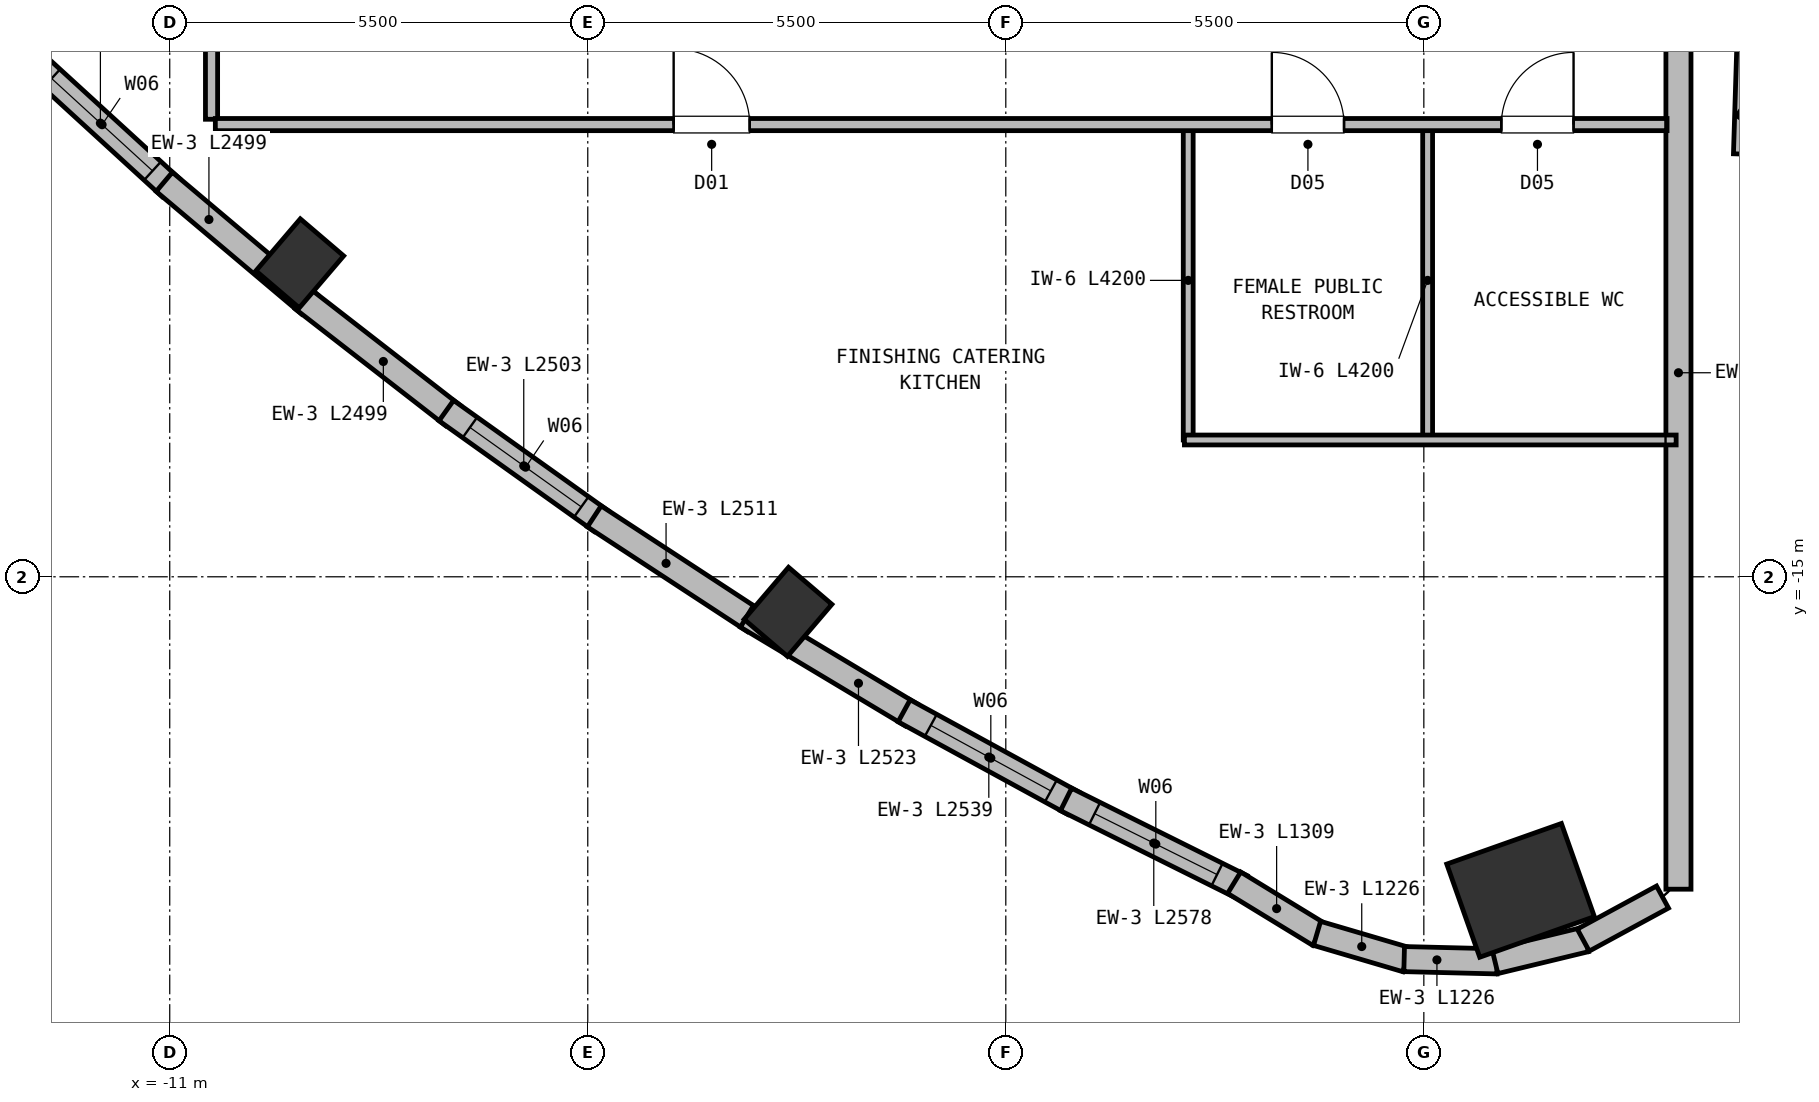
"""IFC4 building model, lengths in metres.
Left out: names, types, materials, properties, quantities, classifications, styles, units other than length and angle.
Written with IfcOpenShell. Run it as: python <this file> out.ifc"""

import sys

from ifc_helpers import new_model, si_unit, direction, frame, frame_2d, origin, origin_2d, place, context, subcontext, project, spatial, rectangle, extrude, element, fill, save


model = new_model("IFC4")
c1 = context("Model", 3, precision=1e-05, world=origin(), true_north=direction((0.0, 1.0)))
c2 = subcontext(c1, "Body", "Model", "MODEL_VIEW")
j1 = project(units=[si_unit("LENGTHUNIT", "METRE"), si_unit("PLANEANGLEUNIT", "RADIAN")], contexts=[c1])
p1 = place(None, origin())
s1 = spatial("IfcSite", under=j1, at=p1, CompositionType="ELEMENT")
p2 = place(p1, origin())
s2 = spatial("IfcBuilding", under=s1, at=p2, CompositionType="ELEMENT")
p3 = place(p2, frame((0.0, 0.0, 294.8)))
s3 = spatial("IfcBuildingStorey", under=s2, at=p3, CompositionType="ELEMENT", Elevation=294.8)
for number, where, z_axis, x_axis in (
    (1, (-9.289, -10.876, 0.0), (0.0, 0.0, 1.0), (-0.76, 0.649, 0.0)),
    (2, (-2.865, -15.461, 0.0), (0.0, 0.0, 1.0), (-0.76, 0.649, 0.0)),
):
    element("IfcColumn", number, at=place(p3, frame(where, z_axis=z_axis, x_axis=x_axis)), inside=s3, PredefinedType="COLUMN", context=c2, shape_type="SweptSolid", body=[
        extrude(rectangle(XDim=0.75, YDim=0.9, at=origin_2d()), origin(), (0.0, 0.0, 1.0), 4.4),
    ])
p4 = place(p3, frame((6.773, -19.126, 0.0), z_axis=(0.0, 0.0, 1.0), x_axis=(-0.333806859234, 0.942641491092, 0.0)))
e3 = element("IfcColumn", 3, at=p4, inside=s3, PredefinedType="COLUMN", context=c2, shape_type="SweptSolid", body=[
    extrude(rectangle(XDim=1.3, YDim=1.6, at=origin_2d()), origin(), (0.0, 0.0, 1.0), 4.4),
])
p5 = place(p3, frame((8.85, -5.52, 0.0), z_axis=(0.0, 0.0, 1.0), x_axis=(0.0, -1.0, 0.0)))
e4 = element("IfcWall", 4, at=p5, inside=s3, PredefinedType="SOLIDWALL", context=c2, shape_type="SweptSolid", body=[
    extrude(rectangle(XDim=13.591, YDim=0.33, at=frame_2d((6.795, 0.0))), origin(), (0.0, 0.0, 1.0), 4.13),
])
p6 = place(p3, frame((9.739, -9.439, 0.0), z_axis=(0.0, 0.0, 1.0), x_axis=(0.031147484759, 0.999514799387, 0.0)))
e5 = element("IfcWall", 5, at=p6, inside=s3, PredefinedType="SOLIDWALL", context=c2, shape_type="SweptSolid", body=[
    extrude(rectangle(XDim=6.114, YDim=0.33, at=frame_2d((3.057, 0.0))), origin(), (0.0, 0.0, 1.0), 3.65),
])
p7 = place(p3, frame((-10.989, -9.876, 0.0), z_axis=(0.0, 0.0, 1.0), x_axis=(-0.737627628948, 0.675207731748, 0.0)))
e6 = element("IfcWall", 6, at=p7, inside=s3, PredefinedType="SOLIDWALL", context=c2, shape_type="SweptSolid", body=[
    extrude(rectangle(XDim=2.503, YDim=0.33, at=frame_2d((1.251, 0.0))), origin(), (0.0, 0.0, 1.0), 4.13),
])
p8 = place(p7, frame((0.322, 0.0, 0.72)))
e7 = element("IfcOpeningElement", 7, at=p8, cuts=e6, PredefinedType="OPENING", context=c2, shape_type="SweptSolid", body=[
    extrude(rectangle(XDim=1.8, YDim=2.25, at=frame_2d((0.9, 1.125))), frame((0.0, 0.175, 0.0), z_axis=(0.0, -1.0, 0.0), x_axis=(1.0, 0.0, 0.0)), (0.0, 0.0, 1.0), 0.35),
])
p9 = place(p3, frame((-9.161, -11.415, 0.0), z_axis=(0.0, 0.0, 1.0), x_axis=(-0.764315556833, 0.644842406781, 0.0)))
e8 = element("IfcWall", 8, at=p9, inside=s3, PredefinedType="SOLIDWALL", context=c2, shape_type="SweptSolid", body=[
    extrude(rectangle(XDim=2.499, YDim=0.33, at=frame_2d((1.25, 0.0))), origin(), (0.0, 0.0, 1.0), 4.13),
])
p10 = place(p3, frame((-7.273, -12.879, 0.0), z_axis=(0.0, 0.0, 1.0), x_axis=(-0.789841179094, 0.613311431336, 0.0)))
e9 = element("IfcWall", 9, at=p10, inside=s3, PredefinedType="SOLIDWALL", context=c2, shape_type="SweptSolid", body=[
    extrude(rectangle(XDim=2.499, YDim=0.33, at=frame_2d((1.25, 0.0))), origin(), (0.0, 0.0, 1.0), 4.13),
])
p11 = place(p3, frame((-5.323, -14.267, 0.0), z_axis=(0.0, 0.0, 1.0), x_axis=(-0.814029925436, 0.580822933857, 0.0)))
e10 = element("IfcWall", 10, at=p11, inside=s3, PredefinedType="SOLIDWALL", context=c2, shape_type="SweptSolid", body=[
    extrude(rectangle(XDim=2.503, YDim=0.33, at=frame_2d((1.251, 0.0))), origin(), (0.0, 0.0, 1.0), 4.13),
])
p12 = place(p11, frame((0.322, 0.0, 0.72)))
e11 = element("IfcOpeningElement", 11, at=p12, cuts=e10, PredefinedType="OPENING", context=c2, shape_type="SweptSolid", body=[
    extrude(rectangle(XDim=1.8, YDim=2.25, at=frame_2d((0.9, 1.125))), frame((0.0, 0.175, 0.0), z_axis=(0.0, -1.0, 0.0), x_axis=(1.0, 0.0, 0.0)), (0.0, 0.0, 1.0), 0.35),
])
p13 = place(p3, frame((-3.313, -15.58, 0.0), z_axis=(0.0, 0.0, 1.0), x_axis=(-0.836746876737, 0.547589868671, 0.0)))
e12 = element("IfcWall", 12, at=p13, inside=s3, PredefinedType="SOLIDWALL", context=c2, shape_type="SweptSolid", body=[
    extrude(rectangle(XDim=2.511, YDim=0.33, at=frame_2d((1.255, 0.0))), origin(), (0.0, 0.0, 1.0), 4.13),
])
p14 = place(p3, frame((-1.242, -16.818, 0.0), z_axis=(0.0, 0.0, 1.0), x_axis=(-0.857902474262, 0.513812557899, 0.0)))
e13 = element("IfcWall", 13, at=p14, inside=s3, PredefinedType="SOLIDWALL", context=c2, shape_type="SweptSolid", body=[
    extrude(rectangle(XDim=2.523, YDim=0.33, at=frame_2d((1.262, 0.0))), origin(), (0.0, 0.0, 1.0), 4.13),
])
p15 = place(p3, frame((0.89, -17.98, 0.0), z_axis=(0.0, 0.0, 1.0), x_axis=(-0.877542510611, 0.479498844702, 0.0)))
e14 = element("IfcWall", 14, at=p15, inside=s3, PredefinedType="SOLIDWALL", context=c2, shape_type="SweptSolid", body=[
    extrude(rectangle(XDim=2.539, YDim=0.33, at=frame_2d((1.269, 0.0))), origin(), (0.0, 0.0, 1.0), 4.13),
])
p16 = place(p15, frame((0.339, 0.0, 0.72)))
e15 = element("IfcOpeningElement", 15, at=p16, cuts=e14, PredefinedType="OPENING", context=c2, shape_type="SweptSolid", body=[
    extrude(rectangle(XDim=1.8, YDim=2.25, at=frame_2d((0.9, 1.125))), frame((0.0, 0.175, 0.0), z_axis=(0.0, -1.0, 0.0), x_axis=(1.0, 0.0, 0.0)), (0.0, 0.0, 1.0), 0.35),
])
p17 = place(p3, frame((3.101, -19.078, 0.0), z_axis=(0.0, 0.0, 1.0), x_axis=(-0.895277941462, 0.445508033073, 0.0)))
e16 = element("IfcWall", 16, at=p17, inside=s3, PredefinedType="SOLIDWALL", context=c2, shape_type="SweptSolid", body=[
    extrude(rectangle(XDim=2.578, YDim=0.33, at=frame_2d((1.289, 0.0))), origin(), (0.0, 0.0, 1.0), 4.13),
])
p18 = place(p17, frame((0.359, 0.0, 0.72)))
e17 = element("IfcOpeningElement", 17, at=p18, cuts=e16, PredefinedType="OPENING", context=c2, shape_type="SweptSolid", body=[
    extrude(rectangle(XDim=1.8, YDim=2.25, at=frame_2d((0.9, 1.125))), frame((0.0, 0.175, 0.0), z_axis=(0.0, -1.0, 0.0), x_axis=(1.0, 0.0, 0.0)), (0.0, 0.0, 1.0), 0.35),
])
p19 = place(p3, frame((4.122, -19.708, 0.0), z_axis=(0.0, 0.0, 1.0), x_axis=(-0.853318707867, 0.521389665034, 0.0)))
e18 = element("IfcWall", 18, at=p19, inside=s3, PredefinedType="SOLIDWALL", context=c2, shape_type="SweptSolid", body=[
    extrude(rectangle(XDim=1.309, YDim=0.33, at=frame_2d((0.655, 0.0))), origin(), (0.0, 0.0, 1.0), 4.13),
])
for number, where, z_axis, x_axis in (
    (19, (5.271, -20.038, 0.0), (0.0, 0.0, 1.0), (-0.959, 0.283, 0.0)),
    (20, (6.467, -20.061, 0.0), (0.0, 0.0, 1.0), (-1.0, 0.025, 0.0)),
):
    element("IfcWall", number, at=place(p3, frame(where, z_axis=z_axis, x_axis=x_axis)), inside=s3, PredefinedType="SOLIDWALL", context=c2, shape_type="SweptSolid", body=[
        extrude(rectangle(XDim=1.226, YDim=0.33, at=frame_2d((0.613, 0.0))), origin(), (0.0, 0.0, 1.0), 4.13),
    ])
p20 = place(p3, frame((7.627, -19.772, 0.0), z_axis=(0.0, 0.0, 1.0), x_axis=(-0.97199913572, -0.234984425353, 0.0)))
e21 = element("IfcWall", 21, at=p20, inside=s3, PredefinedType="SOLIDWALL", context=c2, shape_type="SweptSolid", body=[
    extrude(rectangle(XDim=1.226, YDim=0.33, at=frame_2d((0.613, 0.0))), origin(), (0.0, 0.0, 1.0), 4.13),
])
p21 = place(p3, frame((8.64, -19.214, 0.0), z_axis=(0.0, 0.0, 1.0), x_axis=(-0.878860825238, -0.477078242914, 0.0)))
e22 = element("IfcWall", 22, at=p21, inside=s3, PredefinedType="SOLIDWALL", context=c2, shape_type="SweptSolid", body=[
    extrude(rectangle(XDim=1.187, YDim=0.33, at=frame_2d((0.593, 0.0))), origin(), (0.0, 0.0, 1.0), 4.13),
])
p22 = place(p3, frame((12.352, -10.593, 0.0), z_axis=(0.0, 0.0, 1.0), x_axis=(-0.82687387766, 0.562387402459, 0.0)))
e23 = element("IfcWall", 23, at=p22, inside=s3, PredefinedType="SOLIDWALL", context=c2, shape_type="SweptSolid", body=[
    extrude(rectangle(XDim=3.193, YDim=0.33, at=frame_2d((1.596, 0.0))), origin(), (0.0, 0.0, 1.0), 3.65),
])
for number, where, z_axis, x_axis in (
    (24, (2.4, -9.0, 0.0), (0.0, 0.0, 1.0), (0.0, -1.0, 0.0)),
    (25, (5.55, -9.0, 0.0), (0.0, 0.0, 1.0), (0.0, -1.0, 0.0)),
):
    element("IfcWall", number, at=place(p3, frame(where, z_axis=z_axis, x_axis=x_axis)), inside=s3, PredefinedType="PARTITIONING", context=c2, shape_type="SweptSolid", body=[
        extrude(rectangle(XDim=4.2, YDim=0.13, at=frame_2d((2.1, 0.0))), origin(), (0.0, 0.0, 1.0), 4.13),
    ])
p23 = place(p3, frame((2.35, -13.2, 0.0), z_axis=(0.0, 0.0, 1.0), x_axis=(1.0, 0.0, 0.0)))
e26 = element("IfcWall", 26, at=p23, inside=s3, PredefinedType="PARTITIONING", context=c2, shape_type="SweptSolid", body=[
    extrude(rectangle(XDim=6.469, YDim=0.13, at=frame_2d((3.235, 0.0))), origin(), (0.0, 0.0, 1.0), 4.13),
])
p24 = place(p3, frame((-10.45, 1.1, 0.0), z_axis=(0.0, 0.0, 1.0), x_axis=(0.0, -1.0, 0.0)))
e27 = element("IfcWall", 27, at=p24, inside=s3, PredefinedType="PARTITIONING", context=c2, shape_type="SweptSolid", body=[
    extrude(rectangle(XDim=10.08, YDim=0.16, at=frame_2d((5.04, 0.0))), origin(), (0.0, 0.0, 1.0), 4.13),
])
p25 = place(p3, frame((-10.4, -9.05, 0.0), z_axis=(0.0, 0.0, 1.0), x_axis=(1.0, 0.0, 0.0)))
e28 = element("IfcWall", 28, at=p25, inside=s3, PredefinedType="PARTITIONING", context=c2, shape_type="SweptSolid", body=[
    extrude(rectangle(XDim=19.1, YDim=0.16, at=frame_2d((9.55, 0.0))), origin(), (0.0, 0.0, 1.0), 4.13),
])
p26 = place(p25, frame((6.03, 0.0, 0.0)))
e29 = element("IfcOpeningElement", 29, at=p26, cuts=e28, PredefinedType="OPENING", context=c2, shape_type="SweptSolid", body=[
    extrude(rectangle(XDim=1.0, YDim=2.15, at=frame_2d((0.5, 1.075))), frame((0.0, 0.09, 0.0), z_axis=(0.0, -1.0, 0.0), x_axis=(1.0, 0.0, 0.0)), (0.0, 0.0, 1.0), 0.18),
])
p27 = place(p25, frame((13.9, 0.0, 0.0)))
e30 = element("IfcOpeningElement", 30, at=p27, cuts=e28, PredefinedType="OPENING", context=c2, shape_type="SweptSolid", body=[
    extrude(rectangle(XDim=0.95, YDim=2.1, at=frame_2d((0.475, 1.05))), frame((0.0, 0.09, 0.0), z_axis=(0.0, -1.0, 0.0), x_axis=(1.0, 0.0, 0.0)), (0.0, 0.0, 1.0), 0.18),
])
p28 = place(p25, frame((16.92, 0.0, 0.0)))
e31 = element("IfcOpeningElement", 31, at=p28, cuts=e28, PredefinedType="OPENING", context=c2, shape_type="SweptSolid", body=[
    extrude(rectangle(XDim=0.95, YDim=2.1, at=frame_2d((0.475, 1.05))), frame((0.0, 0.09, 0.0), z_axis=(0.0, -1.0, 0.0), x_axis=(1.0, 0.0, 0.0)), (0.0, 0.0, 1.0), 0.18),
])
p29 = place(p8, origin())
e32 = element("IfcWindow", 32, at=p29, inside=s3, PartitioningType="SINGLE_PANEL", PredefinedType="WINDOW", context=c2, shape_type="SweptSolid", body=[
    extrude(rectangle(XDim=1.8, YDim=2.25, at=frame_2d((0.9, 1.125))), frame((0.0, 0.03, 0.0), z_axis=(0.0, -1.0, 0.0), x_axis=(1.0, 0.0, 0.0)), (0.0, 0.0, 1.0), 0.06),
])
fill(e7, e32)
p30 = place(p12, origin())
e33 = element("IfcWindow", 33, at=p30, inside=s3, PartitioningType="SINGLE_PANEL", PredefinedType="WINDOW", context=c2, shape_type="SweptSolid", body=[
    extrude(rectangle(XDim=1.8, YDim=2.25, at=frame_2d((0.9, 1.125))), frame((0.0, 0.03, 0.0), z_axis=(0.0, -1.0, 0.0), x_axis=(1.0, 0.0, 0.0)), (0.0, 0.0, 1.0), 0.06),
])
fill(e11, e33)
p31 = place(p16, origin())
e34 = element("IfcWindow", 34, at=p31, inside=s3, PartitioningType="SINGLE_PANEL", PredefinedType="WINDOW", context=c2, shape_type="SweptSolid", body=[
    extrude(rectangle(XDim=1.8, YDim=2.25, at=frame_2d((0.9, 1.125))), frame((0.0, 0.03, 0.0), z_axis=(0.0, -1.0, 0.0), x_axis=(1.0, 0.0, 0.0)), (0.0, 0.0, 1.0), 0.06),
])
fill(e15, e34)
p32 = place(p18, origin())
e35 = element("IfcWindow", 35, at=p32, inside=s3, PartitioningType="SINGLE_PANEL", PredefinedType="WINDOW", context=c2, shape_type="SweptSolid", body=[
    extrude(rectangle(XDim=1.8, YDim=2.25, at=frame_2d((0.9, 1.125))), frame((0.0, 0.03, 0.0), z_axis=(0.0, -1.0, 0.0), x_axis=(1.0, 0.0, 0.0)), (0.0, 0.0, 1.0), 0.06),
])
fill(e17, e35)
p33 = place(p26, origin())
e36 = element("IfcDoor", 36, at=p33, inside=s3, OperationType="SINGLE_SWING_LEFT", PredefinedType="DOOR", context=c2, shape_type="SweptSolid", body=[
    extrude(rectangle(XDim=1.0, YDim=2.15, at=frame_2d((0.5, 1.075))), frame((0.0, 0.025, 0.0), z_axis=(0.0, -1.0, 0.0), x_axis=(1.0, 0.0, 0.0)), (0.0, 0.0, 1.0), 0.05),
])
fill(e29, e36)
p34 = place(p27, origin())
e37 = element("IfcDoor", 37, at=p34, inside=s3, OperationType="SINGLE_SWING_LEFT", PredefinedType="DOOR", context=c2, shape_type="SweptSolid", body=[
    extrude(rectangle(XDim=0.95, YDim=2.1, at=frame_2d((0.475, 1.05))), frame((0.0, 0.025, 0.0), z_axis=(0.0, -1.0, 0.0), x_axis=(1.0, 0.0, 0.0)), (0.0, 0.0, 1.0), 0.05),
])
fill(e30, e37)
p35 = place(p28, origin())
e38 = element("IfcDoor", 38, at=p35, inside=s3, OperationType="SINGLE_SWING_RIGHT", PredefinedType="DOOR", context=c2, shape_type="SweptSolid", body=[
    extrude(rectangle(XDim=0.95, YDim=2.1, at=frame_2d((0.475, 1.05))), frame((0.0, 0.025, 0.0), z_axis=(0.0, -1.0, 0.0), x_axis=(1.0, 0.0, 0.0)), (0.0, 0.0, 1.0), 0.05),
])
fill(e31, e38)
save(model, sys.argv[1])
